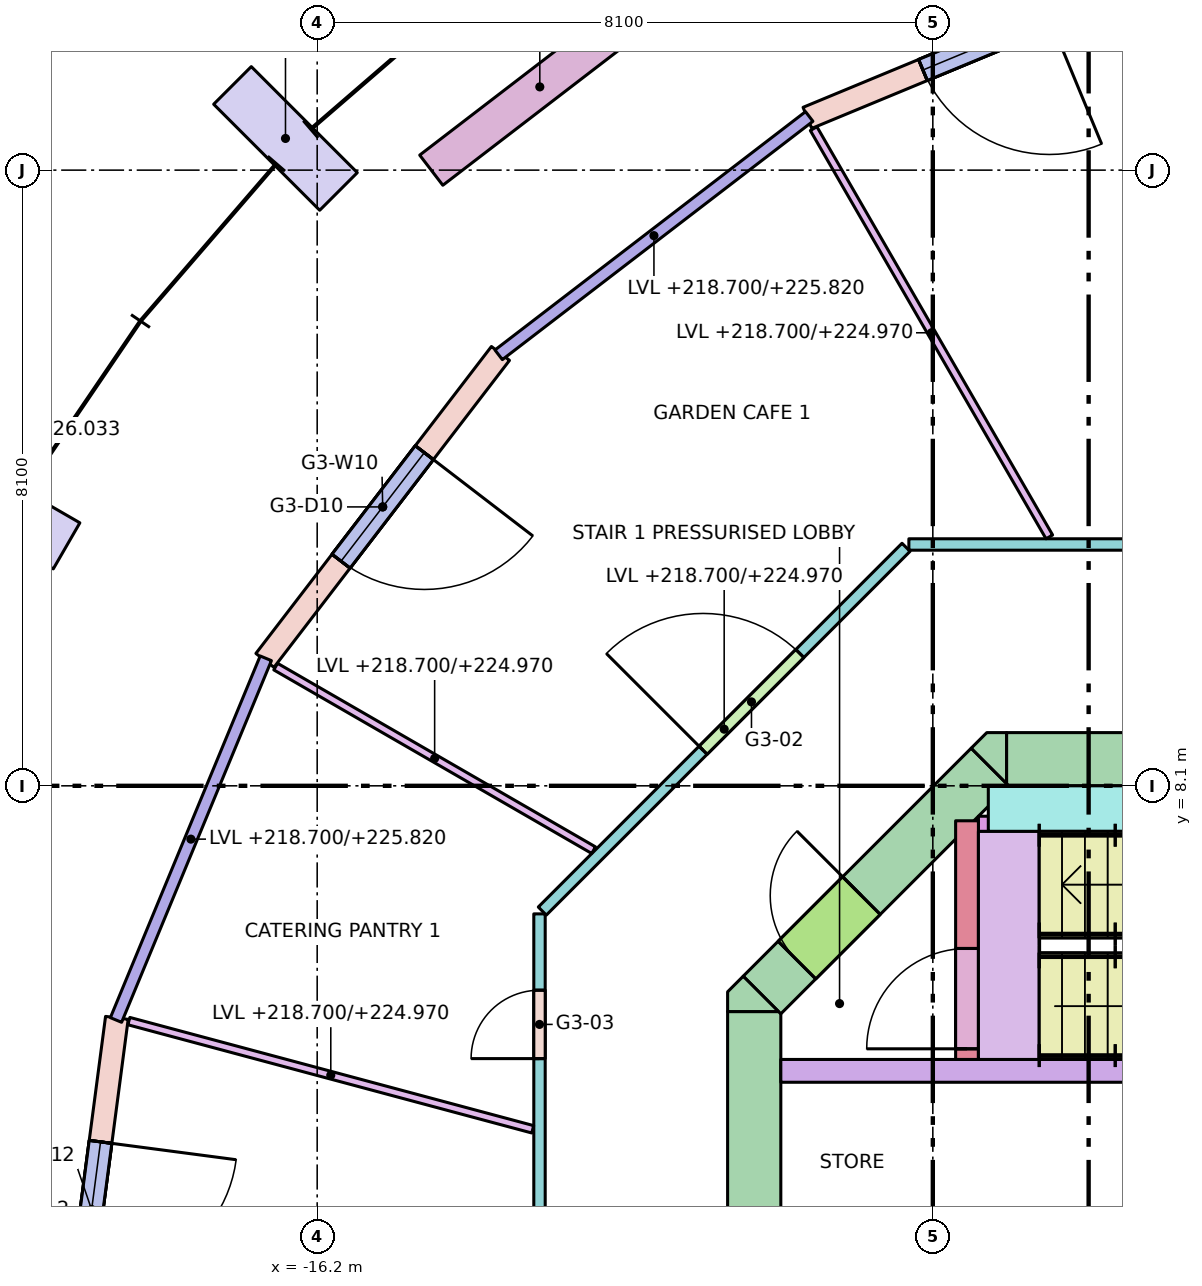
"""IFC4 building model, lengths in metres.
Left out: names, types, materials, properties, quantities, classifications, styles, units other than length and angle.
Written with IfcOpenShell. Run it as: python <this file> out.ifc"""

import sys

from ifc_helpers import new_model, si_unit, direction, frame, frame_2d, origin, origin_2d, place, context, subcontext, project, spatial, polyline, rectangle, outline, extrude, element, fill, save


model = new_model("IFC4")
c1 = context("Model", 3, precision=1e-05, world=origin(), true_north=direction((0.0, 1.0)))
c2 = subcontext(c1, "Body", "Model", "MODEL_VIEW")
j1 = project(units=[si_unit("LENGTHUNIT", "METRE"), si_unit("PLANEANGLEUNIT", "RADIAN")], contexts=[c1])
p1 = place(None, origin())
s1 = spatial("IfcSite", under=j1, at=p1, CompositionType="ELEMENT")
p2 = place(p1, origin())
s2 = spatial("IfcBuilding", under=s1, at=p2, CompositionType="ELEMENT")
p3 = place(p2, frame((0.0, 0.0, 218.7)))
s3 = spatial("IfcBuildingStorey", under=s2, at=p3, CompositionType="ELEMENT", Elevation=218.7)
p4 = place(p3, frame((-16.27, 16.27, 0.067), z_axis=(-0.094697292511, 0.094697292511, 0.990991849403), x_axis=(-0.707106781187, -0.707106781187, 0.0)))
e1 = element("IfcColumn", 1, at=p4, inside=s3, PredefinedType="COLUMN", context=c2, shape_type="SweptSolid", body=[
    extrude(rectangle(XDim=0.7, YDim=1.0, at=origin_2d()), origin(), (0.0, 0.0, 1.0), 7.332),
])
p5 = place(p3, frame((-19.927, 11.505, 0.067), z_axis=(-0.115974555477, 0.066927607381, 0.990994751677), x_axis=(-0.499830087764, -0.866123480438, 0.0)))
e2 = element("IfcColumn", 2, at=p5, inside=s3, PredefinedType="COLUMN", context=c2, shape_type="SweptSolid", body=[
    extrude(rectangle(XDim=0.7, YDim=1.0, at=origin_2d()), origin(), (0.0, 0.0, 1.0), 7.332),
])
p6 = place(p3, frame((-7.13, 8.45, -0.28), z_axis=(0.0, 0.0, 1.0), x_axis=(1.0, 0.0, 0.0)))
e3 = element("IfcWall", 3, at=p6, inside=s3, PredefinedType="SHEAR", context=c2, shape_type="SweptSolid", body=[
    extrude(rectangle(XDim=14.26, YDim=0.7, at=frame_2d((7.13, 0.0))), origin(), (0.0, 0.0, 1.0), 7.4),
])
p7 = place(p6, frame((5.48, 0.0, 0.28)))
e4 = element("IfcOpeningElement", 4, at=p7, cuts=e3, PredefinedType="OPENING", context=c2, shape_type="SweptSolid", body=[
    extrude(rectangle(XDim=0.7, YDim=2.1, at=frame_2d((0.35, 1.05))), frame((0.0, 0.36, 0.0), z_axis=(0.0, -1.0, 0.0), x_axis=(1.0, 0.0, 0.0)), (0.0, 0.0, 1.0), 0.72),
])
p8 = place(p6, frame((7.155, 0.0, 0.28)))
e5 = element("IfcOpeningElement", 5, at=p8, cuts=e3, PredefinedType="OPENING", context=c2, shape_type="SweptSolid", body=[
    extrude(rectangle(XDim=0.9, YDim=2.1, at=frame_2d((0.45, 1.05))), frame((0.0, 0.36, 0.0), z_axis=(0.0, -1.0, 0.0), x_axis=(1.0, 0.0, 0.0)), (0.0, 0.0, 1.0), 0.72),
])
p9 = place(p3, frame((-10.45, -5.13, -0.28), z_axis=(0.0, 0.0, 1.0), x_axis=(0.0, 1.0, 0.0)))
e6 = element("IfcWall", 6, at=p9, inside=s3, PredefinedType="SHEAR", context=c2, shape_type="SweptSolid", body=[
    extrude(rectangle(XDim=10.26, YDim=0.7, at=frame_2d((5.13, 0.0))), origin(), (0.0, 0.0, 1.0), 7.4),
])
p10 = place(p9, frame((4.13, 0.0, 0.28)))
e7 = element("IfcOpeningElement", 7, at=p10, cuts=e6, PredefinedType="OPENING", context=c2, shape_type="SweptSolid", body=[
    extrude(rectangle(XDim=2.0, YDim=2.1, at=frame_2d((1.0, 1.05))), frame((0.0, 0.36, 0.0), z_axis=(0.0, -1.0, 0.0), x_axis=(1.0, 0.0, 0.0)), (0.0, 0.0, 1.0), 0.72),
])
p11 = place(p3, frame((-10.347, 5.347, -0.28), z_axis=(0.0, 0.0, 1.0), x_axis=(0.707106781187, 0.707106781187, 0.0)))
e8 = element("IfcWall", 8, at=p11, inside=s3, PredefinedType="SHEAR", context=c2, shape_type="SweptSolid", body=[
    extrude(rectangle(XDim=4.243, YDim=0.7, at=frame_2d((2.121, 0.0))), origin(), (0.0, 0.0, 1.0), 7.4),
])
p12 = place(p11, frame((0.65, 0.0, 0.28)))
e9 = element("IfcOpeningElement", 9, at=p12, cuts=e8, PredefinedType="OPENING", context=c2, shape_type="SweptSolid", body=[
    extrude(rectangle(XDim=1.2, YDim=2.1, at=frame_2d((0.6, 1.05))), frame((0.0, 0.36, 0.0), z_axis=(0.0, -1.0, 0.0), x_axis=(1.0, 0.0, 0.0)), (0.0, 0.0, 1.0), 0.72),
])
p13 = place(p3, frame((0.0, 0.0, -0.28)))
e10 = element("IfcWall", 10, at=p13, inside=s3, PredefinedType="SHEAR", context=c2, shape_type="SweptSolid", body=[
    extrude(outline(polyline([(-10.595, 5.595), (-10.595, 5.595), (-10.595, 5.595), (-10.13, 5.13), (-10.8, 5.13), (-10.8, 5.13), (-10.8, 5.39), (-10.595, 5.595)])), origin(), (0.0, 0.0, 1.0), 7.4),
])
p14 = place(p3, frame((0.0, 0.0, -0.28)))
e11 = element("IfcWall", 11, at=p14, inside=s3, PredefinedType="SHEAR", context=c2, shape_type="SweptSolid", body=[
    extrude(outline(polyline([(-7.39, 8.8), (-7.13, 8.8), (-7.13, 8.8), (-7.13, 8.13), (-7.595, 8.595), (-7.595, 8.595), (-7.595, 8.595), (-7.39, 8.8)])), origin(), (0.0, 0.0, 1.0), 7.4),
])
p15 = place(p3, frame((-10.1, 4.35, 0.0), z_axis=(0.0, 0.0, 1.0), x_axis=(1.0, 0.0, 0.0)))
e12 = element("IfcWall", 12, at=p15, inside=s3, PredefinedType="SOLIDWALL", context=c2, shape_type="SweptSolid", body=[
    extrude(rectangle(XDim=8.1, YDim=0.3, at=frame_2d((4.05, 0.0))), origin(), (0.0, 0.0, 1.0), 7.12),
])
p16 = place(p3, frame((-7.65, 4.5, 0.0), z_axis=(0.0, 0.0, 1.0), x_axis=(0.0, 1.0, 0.0)))
e13 = element("IfcWall", 13, at=p16, inside=s3, PredefinedType="SHEAR", context=c2, shape_type="SweptSolid", body=[
    extrude(rectangle(XDim=3.14, YDim=0.3, at=frame_2d((1.57, 0.0))), origin(), (0.0, 0.0, 1.0), 7.12),
])
p17 = place(p16, frame((0.14, 0.0, 0.0)))
e14 = element("IfcOpeningElement", 14, at=p17, cuts=e13, PredefinedType="OPENING", context=c2, shape_type="SweptSolid", body=[
    extrude(rectangle(XDim=1.32, YDim=2.1, at=frame_2d((0.66, 1.05))), frame((0.0, 0.16, 0.0), z_axis=(0.0, -1.0, 0.0), x_axis=(1.0, 0.0, 0.0)), (0.0, 0.0, 1.0), 0.32),
])
p18 = place(p3, frame((-7.37, 7.8, 0.0), z_axis=(0.0, 0.0, 1.0), x_axis=(1.0, 0.0, 0.0)))
e15 = element("IfcWall", 15, at=p18, inside=s3, PredefinedType="SHEAR", context=c2, shape_type="SweptSolid", body=[
    extrude(rectangle(XDim=5.37, YDim=0.6, at=frame_2d((2.685, 0.0))), origin(), (0.0, 0.0, 1.0), 7.12),
])
p19 = place(p3, frame((-7.5, 7.6, 0.0), z_axis=(0.0, 0.0, 1.0), x_axis=(1.0, 0.0, 0.0)))
e16 = element("IfcWall", 16, at=p19, inside=s3, PredefinedType="SHEAR", context=c2, shape_type="SweptSolid", body=[
    extrude(rectangle(XDim=0.6, YDim=0.2, at=frame_2d((0.3, 0.0))), origin(), (0.0, 0.0, 1.0), 7.12),
])
p20 = place(p3, frame((-5.047, 18.836, 0.0), z_axis=(0.0, 0.0, 1.0), x_axis=(-0.923862504675, -0.382724538613, 0.0)))
e17 = element("IfcWall", 17, at=p20, inside=s3, PredefinedType="STANDARD", context=c2, shape_type="SweptSolid", body=[
    extrude(rectangle(XDim=5.091, YDim=0.3, at=frame_2d((2.545, 0.0))), origin(), (0.0, 0.0, 1.0), 7.12),
])
p21 = place(p20, frame((1.645, 0.0, 0.0)))
e18 = element("IfcOpeningElement", 18, at=p21, cuts=e17, PredefinedType="OPENING", context=c2, shape_type="SweptSolid", body=[
    extrude(rectangle(XDim=1.8, YDim=2.4, at=frame_2d((0.9, 1.2))), frame((0.0, 0.16, 0.0), z_axis=(0.0, -1.0, 0.0), x_axis=(1.0, 0.0, 0.0)), (0.0, 0.0, 1.0), 0.32),
])
p22 = place(p20, frame((1.645, 0.0, 2.8)))
e19 = element("IfcOpeningElement", 19, at=p22, cuts=e17, PredefinedType="OPENING", context=c2, shape_type="SweptSolid", body=[
    extrude(rectangle(XDim=1.8, YDim=4.1, at=frame_2d((0.9, 2.05))), frame((0.0, 0.16, 0.0), z_axis=(0.0, -1.0, 0.0), x_axis=(1.0, 0.0, 0.0)), (0.0, 0.0, 1.0), 0.32),
])
p23 = place(p3, frame((-13.789, 13.789, 0.0), z_axis=(0.0, 0.0, 1.0), x_axis=(-0.608757714995, -0.79335619014, 0.0)))
e20 = element("IfcWall", 20, at=p23, inside=s3, PredefinedType="STANDARD", context=c2, shape_type="SweptSolid", body=[
    extrude(rectangle(XDim=5.091, YDim=0.3, at=frame_2d((2.545, 0.0))), origin(), (0.0, 0.0, 1.0), 7.12),
])
p24 = place(p23, frame((1.645, 0.0, 0.0)))
e21 = element("IfcOpeningElement", 21, at=p24, cuts=e20, PredefinedType="OPENING", context=c2, shape_type="SweptSolid", body=[
    extrude(rectangle(XDim=1.8, YDim=2.4, at=frame_2d((0.9, 1.2))), frame((0.0, 0.16, 0.0), z_axis=(0.0, -1.0, 0.0), x_axis=(1.0, 0.0, 0.0)), (0.0, 0.0, 1.0), 0.32),
])
p25 = place(p23, frame((1.645, 0.0, 2.8)))
e22 = element("IfcOpeningElement", 22, at=p25, cuts=e20, PredefinedType="OPENING", context=c2, shape_type="SweptSolid", body=[
    extrude(rectangle(XDim=1.8, YDim=4.1, at=frame_2d((0.9, 2.05))), frame((0.0, 0.16, 0.0), z_axis=(0.0, -1.0, 0.0), x_axis=(1.0, 0.0, 0.0)), (0.0, 0.0, 1.0), 0.32),
])
p26 = place(p3, frame((-18.836, 5.047, 0.0), z_axis=(0.0, 0.0, 1.0), x_axis=(-0.130495451964, -0.99144890792, 0.0)))
e23 = element("IfcWall", 23, at=p26, inside=s3, PredefinedType="STANDARD", context=c2, shape_type="SweptSolid", body=[
    extrude(rectangle(XDim=5.091, YDim=0.3, at=frame_2d((2.545, 0.0))), origin(), (0.0, 0.0, 1.0), 7.12),
])
p27 = place(p26, frame((1.645, 0.0, 0.0)))
e24 = element("IfcOpeningElement", 24, at=p27, cuts=e23, PredefinedType="OPENING", context=c2, shape_type="SweptSolid", body=[
    extrude(rectangle(XDim=1.8, YDim=2.4, at=frame_2d((0.9, 1.2))), frame((0.0, 0.16, 0.0), z_axis=(0.0, -1.0, 0.0), x_axis=(1.0, 0.0, 0.0)), (0.0, 0.0, 1.0), 0.32),
])
p28 = place(p26, frame((1.645, 0.0, 2.8)))
e25 = element("IfcOpeningElement", 25, at=p28, cuts=e23, PredefinedType="OPENING", context=c2, shape_type="SweptSolid", body=[
    extrude(rectangle(XDim=1.8, YDim=4.1, at=frame_2d((0.9, 2.05))), frame((0.0, 0.16, 0.0), z_axis=(0.0, -1.0, 0.0), x_axis=(1.0, 0.0, 0.0)), (0.0, 0.0, 1.0), 0.32),
])
p29 = place(p3, frame((-11.843, 18.391, 0.0), z_axis=(0.0, 0.0, 1.0), x_axis=(-0.793326845617, -0.608795955984, 0.0)))
e26 = element("IfcWall", 26, at=p29, inside=s3, PredefinedType="PARAPET", context=c2, shape_type="SweptSolid", body=[
    extrude(rectangle(XDim=3.6, YDim=0.5, at=frame_2d((1.8, 0.0))), origin(), (0.0, 0.0, 1.0), 0.9),
])
p30 = place(p3, frame((-13.275, -6.415, 0.0), z_axis=(0.0, 0.0, 1.0), x_axis=(0.0, 1.0, 0.0)))
e27 = element("IfcWall", 27, at=p30, inside=s3, PredefinedType="PARTITIONING", context=c2, shape_type="SweptSolid", body=[
    extrude(rectangle(XDim=12.83, YDim=0.15, at=frame_2d((6.415, 0.0))), origin(), (0.0, 0.0, 1.0), 6.27),
])
p31 = place(p30, frame((10.926, 0.0, 0.0)))
e28 = element("IfcOpeningElement", 28, at=p31, cuts=e27, PredefinedType="OPENING", context=c2, shape_type="SweptSolid", body=[
    extrude(rectangle(XDim=0.9, YDim=2.1, at=frame_2d((0.45, 1.05))), frame((0.0, 0.085, 0.0), z_axis=(0.0, -1.0, 0.0), x_axis=(1.0, 0.0, 0.0)), (0.0, 0.0, 1.0), 0.17),
])
p32 = place(p30, frame((7.744, 0.0, 0.0)))
e29 = element("IfcOpeningElement", 29, at=p32, cuts=e27, PredefinedType="OPENING", context=c2, shape_type="SweptSolid", body=[
    extrude(rectangle(XDim=0.9, YDim=2.1, at=frame_2d((0.45, 1.05))), frame((0.0, 0.085, 0.0), z_axis=(0.0, -1.0, 0.0), x_axis=(1.0, 0.0, 0.0)), (0.0, 0.0, 1.0), 0.17),
])
p33 = place(p30, frame((2.733, 0.0, 0.0)))
e30 = element("IfcOpeningElement", 30, at=p33, cuts=e27, PredefinedType="OPENING", context=c2, shape_type="SweptSolid", body=[
    extrude(rectangle(XDim=1.0, YDim=2.1, at=frame_2d((0.5, 1.05))), frame((0.0, 0.085, 0.0), z_axis=(0.0, -1.0, 0.0), x_axis=(1.0, 0.0, 0.0)), (0.0, 0.0, 1.0), 0.17),
])
p34 = place(p3, frame((-13.238, 6.452, 0.0), z_axis=(0.0, 0.0, 1.0), x_axis=(0.707106781187, 0.707106781187, 0.0)))
e31 = element("IfcWall", 31, at=p34, inside=s3, PredefinedType="PARTITIONING", context=c2, shape_type="SweptSolid", body=[
    extrude(rectangle(XDim=6.768, YDim=0.15, at=frame_2d((3.384, 0.0))), origin(), (0.0, 0.0, 1.0), 6.27),
])
p35 = place(p34, frame((2.992, 0.0, 0.0)))
e32 = element("IfcOpeningElement", 32, at=p35, cuts=e31, PredefinedType="OPENING", context=c2, shape_type="SweptSolid", body=[
    extrude(rectangle(XDim=1.8, YDim=2.1, at=frame_2d((0.9, 1.05))), frame((0.0, 0.085, 0.0), z_axis=(0.0, -1.0, 0.0), x_axis=(1.0, 0.0, 0.0)), (0.0, 0.0, 1.0), 0.17),
])
p36 = place(p3, frame((-8.415, 11.275, 0.0), z_axis=(0.0, 0.0, 1.0), x_axis=(1.0, 0.0, 0.0)))
e33 = element("IfcWall", 33, at=p36, inside=s3, PredefinedType="PARTITIONING", context=c2, shape_type="SweptSolid", body=[
    extrude(rectangle(XDim=16.83, YDim=0.15, at=frame_2d((8.415, 0.0))), origin(), (0.0, 0.0, 1.0), 6.27),
])
p37 = place(p36, frame((4.256, 0.0, 0.0)))
e34 = element("IfcOpeningElement", 34, at=p37, cuts=e33, PredefinedType="OPENING", context=c2, shape_type="SweptSolid", body=[
    extrude(rectangle(XDim=1.8, YDim=2.1, at=frame_2d((0.9, 1.05))), frame((0.0, 0.085, 0.0), z_axis=(0.0, -1.0, 0.0), x_axis=(1.0, 0.0, 0.0)), (0.0, 0.0, 1.0), 0.17),
])
p38 = place(p36, frame((12.734, 0.0, 0.0)))
e35 = element("IfcOpeningElement", 35, at=p38, cuts=e33, PredefinedType="OPENING", context=c2, shape_type="SweptSolid", body=[
    extrude(rectangle(XDim=0.9, YDim=2.1, at=frame_2d((0.45, 1.05))), frame((0.0, 0.085, 0.0), z_axis=(0.0, -1.0, 0.0), x_axis=(1.0, 0.0, 0.0)), (0.0, 0.0, 1.0), 0.17),
])
p39 = place(p36, frame((9.477, 0.0, 0.0)))
e36 = element("IfcOpeningElement", 36, at=p39, cuts=e33, PredefinedType="OPENING", context=c2, shape_type="SweptSolid", body=[
    extrude(rectangle(XDim=0.9, YDim=2.1, at=frame_2d((0.45, 1.05))), frame((0.0, 0.085, 0.0), z_axis=(0.0, -1.0, 0.0), x_axis=(1.0, 0.0, 0.0)), (0.0, 0.0, 1.0), 0.17),
])
p40 = place(p3, frame((-6.567, 11.375, 0.0), z_axis=(0.0, 0.0, 1.0), x_axis=(-0.500004114527, 0.866023028248, 0.0)))
e37 = element("IfcWall", 37, at=p40, inside=s3, PredefinedType="PARTITIONING", context=c2, shape_type="SweptSolid", body=[
    extrude(rectangle(XDim=6.203, YDim=0.1, at=frame_2d((3.101, 0.0))), origin(), (0.0, 0.0, 1.0), 6.27),
])
p41 = place(p3, frame((-12.563, 7.253, 0.0), z_axis=(0.0, 0.0, 1.0), x_axis=(-0.866032396701, 0.499987887718, 0.0)))
e38 = element("IfcWall", 38, at=p41, inside=s3, PredefinedType="PARTITIONING", context=c2, shape_type="SweptSolid", body=[
    extrude(rectangle(XDim=4.83, YDim=0.1, at=frame_2d((2.415, 0.0))), origin(), (0.0, 0.0, 1.0), 6.27),
])
p42 = place(p3, frame((-13.364, 3.581, 0.0), z_axis=(0.0, 0.0, 1.0), x_axis=(-0.965932996121, 0.258792285443, 0.0)))
e39 = element("IfcWall", 39, at=p42, inside=s3, PredefinedType="PARTITIONING", context=c2, shape_type="SweptSolid", body=[
    extrude(rectangle(XDim=5.501, YDim=0.1, at=frame_2d((2.75, 0.0))), origin(), (0.0, 0.0, 1.0), 6.27),
])
p43 = place(p21, origin())
e40 = element("IfcDoor", 40, at=p43, inside=s3, OperationType="SINGLE_SWING_LEFT", PredefinedType="DOOR", context=c2, shape_type="SweptSolid", body=[
    extrude(rectangle(XDim=1.8, YDim=2.4, at=frame_2d((0.9, 1.2))), frame((0.0, 0.025, 0.0), z_axis=(0.0, -1.0, 0.0), x_axis=(1.0, 0.0, 0.0)), (0.0, 0.0, 1.0), 0.05),
])
fill(e18, e40)
p44 = place(p22, origin())
e41 = element("IfcWindow", 41, at=p44, inside=s3, PartitioningType="SINGLE_PANEL", PredefinedType="WINDOW", context=c2, shape_type="SweptSolid", body=[
    extrude(rectangle(XDim=1.8, YDim=4.1, at=frame_2d((0.9, 2.05))), frame((0.0, 0.03, 0.0), z_axis=(0.0, -1.0, 0.0), x_axis=(1.0, 0.0, 0.0)), (0.0, 0.0, 1.0), 0.06),
])
fill(e19, e41)
p45 = place(p24, origin())
e42 = element("IfcDoor", 42, at=p45, inside=s3, OperationType="SINGLE_SWING_LEFT", PredefinedType="DOOR", context=c2, shape_type="SweptSolid", body=[
    extrude(rectangle(XDim=1.8, YDim=2.4, at=frame_2d((0.9, 1.2))), frame((0.0, 0.025, 0.0), z_axis=(0.0, -1.0, 0.0), x_axis=(1.0, 0.0, 0.0)), (0.0, 0.0, 1.0), 0.05),
])
fill(e21, e42)
p46 = place(p25, origin())
e43 = element("IfcWindow", 43, at=p46, inside=s3, PartitioningType="SINGLE_PANEL", PredefinedType="WINDOW", context=c2, shape_type="SweptSolid", body=[
    extrude(rectangle(XDim=1.8, YDim=4.1, at=frame_2d((0.9, 2.05))), frame((0.0, 0.03, 0.0), z_axis=(0.0, -1.0, 0.0), x_axis=(1.0, 0.0, 0.0)), (0.0, 0.0, 1.0), 0.06),
])
fill(e22, e43)
p47 = place(p27, origin())
e44 = element("IfcDoor", 44, at=p47, inside=s3, OperationType="SINGLE_SWING_LEFT", PredefinedType="DOOR", context=c2, shape_type="SweptSolid", body=[
    extrude(rectangle(XDim=1.8, YDim=2.4, at=frame_2d((0.9, 1.2))), frame((0.0, 0.025, 0.0), z_axis=(0.0, -1.0, 0.0), x_axis=(1.0, 0.0, 0.0)), (0.0, 0.0, 1.0), 0.05),
])
fill(e24, e44)
p48 = place(p28, origin())
e45 = element("IfcWindow", 45, at=p48, inside=s3, PartitioningType="SINGLE_PANEL", PredefinedType="WINDOW", context=c2, shape_type="SweptSolid", body=[
    extrude(rectangle(XDim=1.8, YDim=4.1, at=frame_2d((0.9, 2.05))), frame((0.0, 0.03, 0.0), z_axis=(0.0, -1.0, 0.0), x_axis=(1.0, 0.0, 0.0)), (0.0, 0.0, 1.0), 0.06),
])
fill(e25, e45)
p49 = place(p17, origin())
e46 = element("IfcDoor", 46, at=p49, inside=s3, OperationType="DOUBLE_DOOR_SINGLE_SWING", PredefinedType="DOOR", context=c2, shape_type="SweptSolid", body=[
    extrude(rectangle(XDim=1.32, YDim=2.1, at=frame_2d((0.66, 1.05))), frame((0.0, 0.025, 0.0), z_axis=(0.0, -1.0, 0.0), x_axis=(1.0, 0.0, 0.0)), (0.0, 0.0, 1.0), 0.05),
])
fill(e14, e46)
p50 = place(p12, origin())
e47 = element("IfcDoor", 47, at=p50, inside=s3, OperationType="SINGLE_SWING_RIGHT", PredefinedType="DOOR", context=c2, shape_type="SweptSolid", body=[
    extrude(rectangle(XDim=1.2, YDim=2.1, at=frame_2d((0.6, 1.05))), frame((0.0, 0.025, 0.0), z_axis=(0.0, -1.0, 0.0), x_axis=(1.0, 0.0, 0.0)), (0.0, 0.0, 1.0), 0.05),
])
fill(e9, e47)
p51 = place(p35, origin())
e48 = element("IfcDoor", 48, at=p51, inside=s3, OperationType="DOUBLE_DOOR_SINGLE_SWING", PredefinedType="DOOR", context=c2, shape_type="SweptSolid", body=[
    extrude(rectangle(XDim=1.8, YDim=2.1, at=frame_2d((0.9, 1.05))), frame((0.0, 0.025, 0.0), z_axis=(0.0, -1.0, 0.0), x_axis=(1.0, 0.0, 0.0)), (0.0, 0.0, 1.0), 0.05),
])
fill(e32, e48)
p52 = place(p31, origin())
e49 = element("IfcDoor", 49, at=p52, inside=s3, OperationType="SINGLE_SWING_LEFT", PredefinedType="DOOR", context=c2, shape_type="SweptSolid", body=[
    extrude(rectangle(XDim=0.9, YDim=2.1, at=frame_2d((0.45, 1.05))), frame((0.0, 0.025, 0.0), z_axis=(0.0, -1.0, 0.0), x_axis=(1.0, 0.0, 0.0)), (0.0, 0.0, 1.0), 0.05),
])
fill(e28, e49)
save(model, sys.argv[1])
